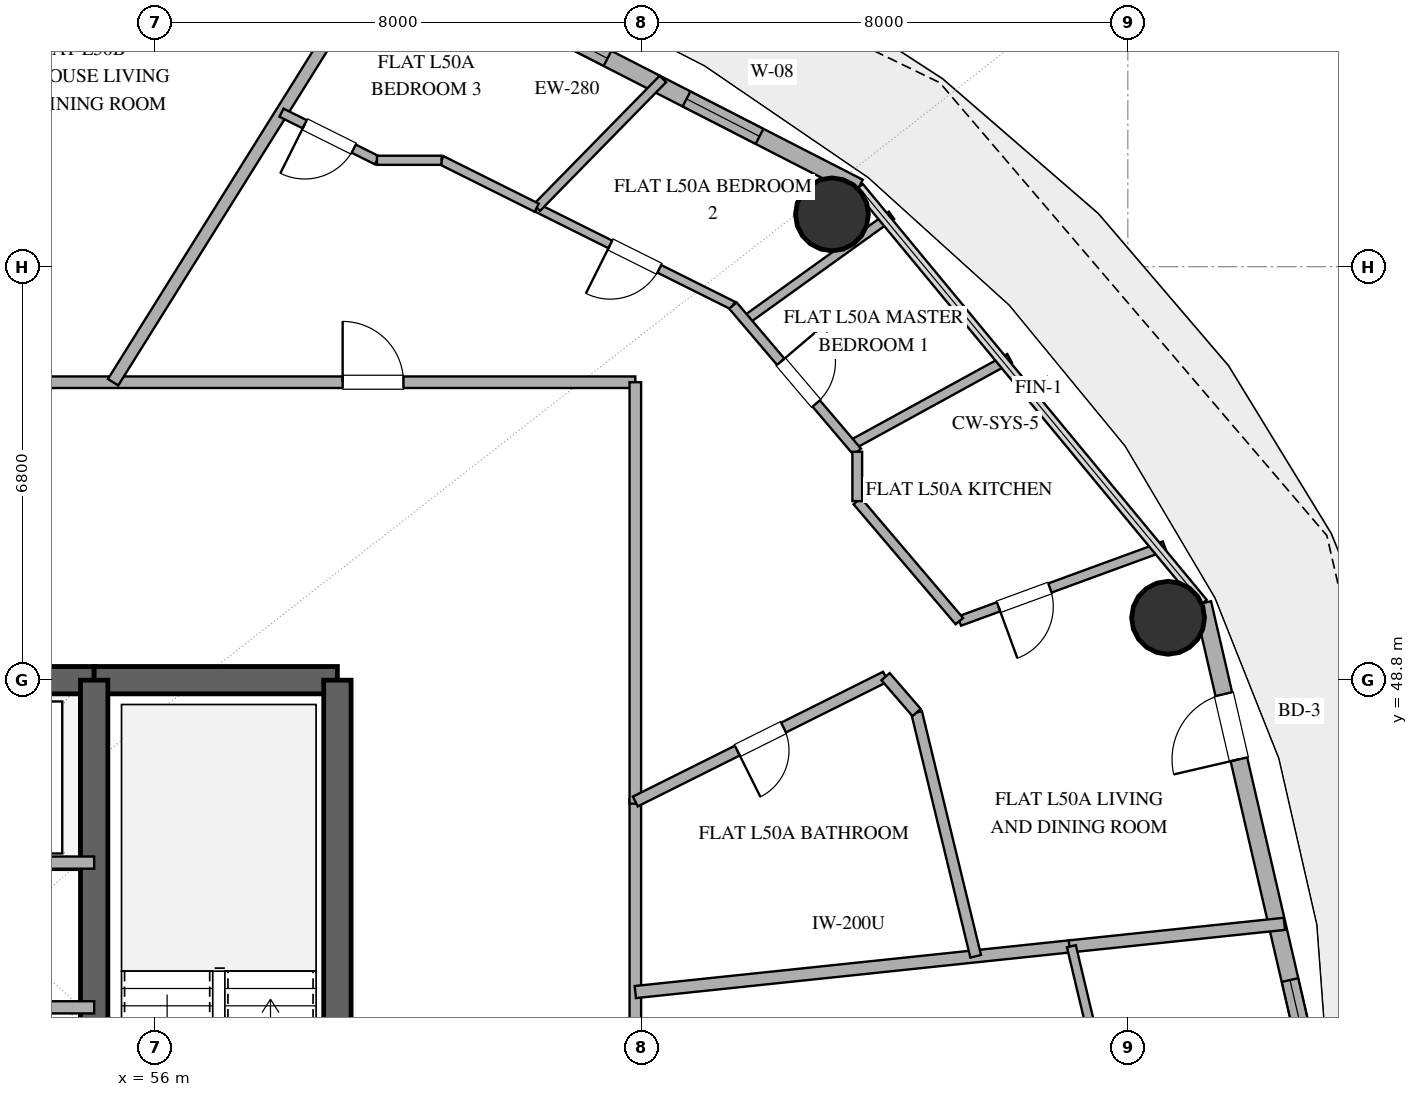
"""IFC4 building model, lengths in metres.
Left out: names, types, materials, properties, quantities, classifications, styles, units other than length and angle.
Written with IfcOpenShell. Run it as: python <this file> out.ifc"""

import sys

from ifc_helpers import new_model, si_unit, direction, frame, frame_2d, origin, origin_2d, place, context, subcontext, project, spatial, rectangle, hollow_circle, extrude, element, fill, save


model = new_model("IFC4")
c1 = context("Model", 3, precision=1e-05, world=origin(), true_north=direction((0.0, 1.0)))
c2 = subcontext(c1, "Body", "Model", "MODEL_VIEW")
j1 = project(units=[si_unit("LENGTHUNIT", "METRE"), si_unit("PLANEANGLEUNIT", "RADIAN")], contexts=[c1])
p1 = place(None, origin())
s1 = spatial("IfcSite", under=j1, at=p1, CompositionType="ELEMENT")
p2 = place(p1, origin())
s2 = spatial("IfcBuilding", under=s1, at=p2, CompositionType="ELEMENT")
p3 = place(p2, frame((0.0, 0.0, 197.4)))
s3 = spatial("IfcBuildingStorey", under=s2, at=p3, CompositionType="ELEMENT", Elevation=197.4)
p4 = place(p3, frame((41.0, 48.8, 0.0), z_axis=(0.0, 0.0, 1.0), x_axis=(1.0, 0.0, 0.0)))
e1 = element("IfcWall", 1, at=p4, inside=s3, PredefinedType="SHEAR", context=c2, shape_type="SweptSolid", body=[
    extrude(rectangle(XDim=14.0, YDim=0.45, at=frame_2d((7.0, 0.0))), origin(), (0.0, 0.0, 1.0), 3.25),
])
p5 = place(p4, frame((6.1, 0.0, 0.0)))
e2 = element("IfcOpeningElement", 2, at=p5, cuts=e1, PredefinedType="OPENING", context=c2, shape_type="SweptSolid", body=[
    extrude(rectangle(XDim=1.8, YDim=2.25, at=frame_2d((0.9, 1.125))), frame((0.0, 0.235, 0.0), z_axis=(0.0, -1.0, 0.0), x_axis=(1.0, 0.0, 0.0)), (0.0, 0.0, 1.0), 0.47),
])
p6 = place(p3, frame((55.0, 48.8, 0.0), z_axis=(0.0, 0.0, 1.0), x_axis=(1.0, 0.0, 0.0)))
e3 = element("IfcWall", 3, at=p6, inside=s3, PredefinedType="SHEAR", context=c2, shape_type="SweptSolid", body=[
    extrude(rectangle(XDim=4.0, YDim=0.45, at=frame_2d((2.0, 0.0))), origin(), (0.0, 0.0, 1.0), 3.25),
])
p7 = place(p3, frame((59.0, 35.2, 0.0), z_axis=(0.0, 0.0, 1.0), x_axis=(0.0, 1.0, 0.0)))
e4 = element("IfcWall", 4, at=p7, inside=s3, PredefinedType="SHEAR", context=c2, shape_type="SweptSolid", body=[
    extrude(rectangle(XDim=13.6, YDim=0.45, at=frame_2d((6.8, 0.0))), origin(), (0.0, 0.0, 1.0), 3.25),
])
p8 = place(p3, frame((55.0, 35.2, 0.0), z_axis=(0.0, 0.0, 1.0), x_axis=(0.0, 1.0, 0.0)))
e5 = element("IfcWall", 5, at=p8, inside=s3, PredefinedType="SHEAR", context=c2, shape_type="SweptSolid", body=[
    extrude(rectangle(XDim=13.6, YDim=0.45, at=frame_2d((6.8, 0.0))), origin(), (0.0, 0.0, 1.0), 3.25),
])
p9 = place(p8, frame((1.15, 0.0, 0.0)))
e6 = element("IfcOpeningElement", 6, at=p9, cuts=e5, PredefinedType="OPENING", context=c2, shape_type="SweptSolid", body=[
    extrude(rectangle(XDim=1.1, YDim=2.2, at=frame_2d((0.55, 1.1))), frame((0.0, 0.235, 0.0), z_axis=(0.0, -1.0, 0.0), x_axis=(1.0, 0.0, 0.0)), (0.0, 0.0, 1.0), 0.47),
])
for number, where, z_axis, x_axis in (
    (7, (72.662, 49.826, 0.0), (0.0, 0.0, 1.0), (1.0, 0.0, 0.0)),
    (8, (67.134, 56.46, 0.0), (0.0, 0.0, 1.0), (1.0, 0.0, 0.0)),
):
    element("IfcColumn", number, at=place(p3, frame(where, z_axis=z_axis, x_axis=x_axis)), inside=s3, PredefinedType="COLUMN", context=c2, shape_type="SweptSolid", body=[
        extrude(hollow_circle(Radius=0.6, WallThickness=0.032, at=origin_2d()), origin(), (0.0, 0.0, 1.0), 3.25),
    ])
p10 = place(p3, frame((75.099, 42.0, 0.0), z_axis=(0.0, 0.0, 1.0), x_axis=(-0.225473184558, 0.974249374157, 0.0)))
e9 = element("IfcWall", 9, at=p10, inside=s3, PredefinedType="SOLIDWALL", context=c2, shape_type="SweptSolid", body=[
    extrude(rectangle(XDim=8.28, YDim=0.28, at=frame_2d((4.14, 0.0))), origin(), (0.0, 0.0, 1.0), 3.25),
])
p11 = place(p10, frame((5.644, 0.0, 0.0)))
e10 = element("IfcOpeningElement", 10, at=p11, cuts=e9, PredefinedType="OPENING", context=c2, shape_type="SweptSolid", body=[
    extrude(rectangle(XDim=1.1, YDim=2.25, at=frame_2d((0.55, 1.125))), frame((0.0, 0.15, 0.0), z_axis=(0.0, -1.0, 0.0), x_axis=(1.0, 0.0, 0.0)), (0.0, 0.0, 1.0), 0.3),
])
p12 = place(p10, frame((0.918, 0.0, 0.85)))
e11 = element("IfcOpeningElement", 11, at=p12, cuts=e9, PredefinedType="OPENING", context=c2, shape_type="SweptSolid", body=[
    extrude(rectangle(XDim=1.0, YDim=1.8, at=frame_2d((0.5, 0.9))), frame((0.0, 0.15, 0.0), z_axis=(0.0, -1.0, 0.0), x_axis=(1.0, 0.0, 0.0)), (0.0, 0.0, 1.0), 0.3),
])
p13 = place(p3, frame((67.576, 56.906, 0.0), z_axis=(0.0, 0.0, 1.0), x_axis=(-0.889872523182, 0.456209263919, 0.0)))
e12 = element("IfcWall", 12, at=p13, inside=s3, PredefinedType="SOLIDWALL", context=c2, shape_type="SweptSolid", body=[
    extrude(rectangle(XDim=10.016, YDim=0.28, at=frame_2d((5.008, 0.0))), origin(), (0.0, 0.0, 1.0), 3.25),
])
p14 = place(p13, frame((1.835, 0.0, 0.85)))
e13 = element("IfcOpeningElement", 13, at=p14, cuts=e12, PredefinedType="OPENING", context=c2, shape_type="SweptSolid", body=[
    extrude(rectangle(XDim=1.35, YDim=1.8, at=frame_2d((0.675, 0.9))), frame((0.0, 0.15, 0.0), z_axis=(0.0, -1.0, 0.0), x_axis=(1.0, 0.0, 0.0)), (0.0, 0.0, 1.0), 0.3),
])
p15 = place(p13, frame((4.645, 0.0, 0.85)))
e14 = element("IfcOpeningElement", 14, at=p15, cuts=e12, PredefinedType="OPENING", context=c2, shape_type="SweptSolid", body=[
    extrude(rectangle(XDim=1.2, YDim=1.8, at=frame_2d((0.6, 0.9))), frame((0.0, 0.15, 0.0), z_axis=(0.0, -1.0, 0.0), x_axis=(1.0, 0.0, 0.0)), (0.0, 0.0, 1.0), 0.3),
])
p16 = place(p13, frame((6.559, 0.0, 0.85)))
e15 = element("IfcOpeningElement", 15, at=p16, cuts=e12, PredefinedType="OPENING", context=c2, shape_type="SweptSolid", body=[
    extrude(rectangle(XDim=1.2, YDim=1.8, at=frame_2d((0.6, 0.9))), frame((0.0, 0.15, 0.0), z_axis=(0.0, -1.0, 0.0), x_axis=(1.0, 0.0, 0.0)), (0.0, 0.0, 1.0), 0.3),
])
for number, where, z_axis, x_axis in (
    (16, (52.05, 43.42, 0.0), (0.0, 0.0, 1.0), (1.0, 0.0, 0.0)),
    (17, (52.05, 45.8, 0.0), (0.0, 0.0, 1.0), (1.0, 0.0, 0.0)),
):
    element("IfcWall", number, at=place(p3, frame(where, z_axis=z_axis, x_axis=x_axis)), inside=s3, PredefinedType="SOLIDWALL", context=c2, shape_type="SweptSolid", body=[
        extrude(rectangle(XDim=2.95, YDim=0.2, at=frame_2d((1.475, 0.0))), origin(), (0.0, 0.0, 1.0), 2.61),
    ])
p17 = place(p3, frame((44.784, 53.7, 0.0), z_axis=(0.0, 0.0, 1.0), x_axis=(1.0, 0.0, 0.0)))
e18 = element("IfcWall", 18, at=p17, inside=s3, PredefinedType="PARTITIONING", context=c2, shape_type="SweptSolid", body=[
    extrude(rectangle(XDim=19.116, YDim=0.19, at=frame_2d((9.558, 0.0))), origin(), (0.0, 0.0, 1.0), 2.61),
])
p18 = place(p17, frame((14.302, 0.0, 0.0)))
e19 = element("IfcOpeningElement", 19, at=p18, cuts=e18, PredefinedType="OPENING", context=c2, shape_type="SweptSolid", body=[
    extrude(rectangle(XDim=1.0, YDim=2.2, at=frame_2d((0.5, 1.1))), frame((0.0, 0.105, 0.0), z_axis=(0.0, -1.0, 0.0), x_axis=(1.0, 0.0, 0.0)), (0.0, 0.0, 1.0), 0.21),
])
p19 = place(p17, frame((6.783, 0.0, 0.0)))
e20 = element("IfcOpeningElement", 20, at=p19, cuts=e18, PredefinedType="OPENING", context=c2, shape_type="SweptSolid", body=[
    extrude(rectangle(XDim=1.0, YDim=2.2, at=frame_2d((0.5, 1.1))), frame((0.0, 0.105, 0.0), z_axis=(0.0, -1.0, 0.0), x_axis=(1.0, 0.0, 0.0)), (0.0, 0.0, 1.0), 0.21),
])
p20 = place(p3, frame((63.9, 46.841, 0.0), z_axis=(0.0, 0.0, 1.0), x_axis=(0.0, -1.0, 0.0)))
e21 = element("IfcWall", 21, at=p20, inside=s3, PredefinedType="PARTITIONING", context=c2, shape_type="SweptSolid", body=[
    extrude(rectangle(XDim=12.632, YDim=0.19, at=frame_2d((6.316, 0.0))), origin(), (0.0, 0.0, 1.0), 2.61),
])
p21 = place(p3, frame((63.9, 53.7, 0.0), z_axis=(0.0, 0.0, 1.0), x_axis=(0.0, -1.0, 0.0)))
e22 = element("IfcWall", 22, at=p21, inside=s3, PredefinedType="PARTITIONING", context=c2, shape_type="SweptSolid", body=[
    extrude(rectangle(XDim=6.931, YDim=0.19, at=frame_2d((3.465, 0.0))), origin(), (0.0, 0.0, 1.0), 2.61),
])
p22 = place(p3, frame((63.9, 43.671, 0.0), z_axis=(0.0, 0.0, 1.0), x_axis=(0.994523063153, 0.104517351942, 0.0)))
e23 = element("IfcWall", 23, at=p22, inside=s3, PredefinedType="PARTITIONING", context=c2, shape_type="SweptSolid", body=[
    extrude(rectangle(XDim=7.211, YDim=0.2, at=frame_2d((3.605, 0.0))), origin(), (0.0, 0.0, 1.0), 2.61),
])
p23 = place(p3, frame((55.311, 53.7, 0.0), z_axis=(0.0, 0.0, 1.0), x_axis=(0.529914717401, 0.848050937315, 0.0)))
e24 = element("IfcWall", 24, at=p23, inside=s3, PredefinedType="PARTITIONING", context=c2, shape_type="SweptSolid", body=[
    extrude(rectangle(XDim=8.599, YDim=0.2, at=frame_2d((4.299, 0.0))), origin(), (0.0, 0.0, 1.0), 2.61),
])
p24 = place(p3, frame((68.016, 48.858, 0.0), z_axis=(0.0, 0.0, 1.0), x_axis=(-0.894872643331, -0.446321579377, 0.0)))
e25 = element("IfcWall", 25, at=p24, inside=s3, PredefinedType="PLUMBINGWALL", context=c2, shape_type="SweptSolid", body=[
    extrude(rectangle(XDim=4.599, YDim=0.18, at=frame_2d((2.3, 0.0))), origin(), (0.0, 0.0, 1.0), 2.61),
])
p25 = place(p24, frame((1.875, 0.0, 0.0)))
e26 = element("IfcOpeningElement", 26, at=p25, cuts=e25, PredefinedType="OPENING", context=c2, shape_type="SweptSolid", body=[
    extrude(rectangle(XDim=0.85, YDim=2.1, at=frame_2d((0.425, 1.05))), frame((0.0, 0.1, 0.0), z_axis=(0.0, -1.0, 0.0), x_axis=(1.0, 0.0, 0.0)), (0.0, 0.0, 1.0), 0.2),
])
p26 = place(p3, frame((69.498, 44.26, 0.0), z_axis=(0.0, 0.0, 1.0), x_axis=(-0.235510241151, 0.97187186723, 0.0)))
e27 = element("IfcWall", 27, at=p26, inside=s3, PredefinedType="PLUMBINGWALL", context=c2, shape_type="SweptSolid", body=[
    extrude(rectangle(XDim=4.125, YDim=0.18, at=frame_2d((2.062, 0.0))), origin(), (0.0, 0.0, 1.0), 2.61),
])
p27 = place(p3, frame((65.505, 54.961, 0.0), z_axis=(0.0, 0.0, 1.0), x_axis=(-0.894941244144, 0.4461840086, 0.0)))
e28 = element("IfcWall", 28, at=p27, inside=s3, PredefinedType="PARTITIONING", context=c2, shape_type="SweptSolid", body=[
    extrude(rectangle(XDim=3.605, YDim=0.14, at=frame_2d((1.803, 0.0))), origin(), (0.0, 0.0, 1.0), 2.61),
])
p28 = place(p27, frame((1.353, 0.0, 0.0)))
e29 = element("IfcOpeningElement", 29, at=p28, cuts=e28, PredefinedType="OPENING", context=c2, shape_type="SweptSolid", body=[
    extrude(rectangle(XDim=0.9, YDim=2.1, at=frame_2d((0.45, 1.05))), frame((0.0, 0.08, 0.0), z_axis=(0.0, -1.0, 0.0), x_axis=(1.0, 0.0, 0.0)), (0.0, 0.0, 1.0), 0.16),
])
p29 = place(p3, frame((72.603, 51.006, 0.0), z_axis=(0.0, 0.0, 1.0), x_axis=(-0.939057046145, -0.343761347572, 0.0)))
e30 = element("IfcWall", 30, at=p29, inside=s3, PredefinedType="PLUMBINGWALL", context=c2, shape_type="SweptSolid", body=[
    extrude(rectangle(XDim=3.592, YDim=0.16, at=frame_2d((1.796, 0.0))), origin(), (0.0, 0.0, 1.0), 2.61),
])
p30 = place(p29, frame((2.006, 0.0, 0.0)))
e31 = element("IfcOpeningElement", 31, at=p30, cuts=e30, PredefinedType="OPENING", context=c2, shape_type="SweptSolid", body=[
    extrude(rectangle(XDim=0.9, YDim=2.1, at=frame_2d((0.45, 1.05))), frame((0.0, 0.09, 0.0), z_axis=(0.0, -1.0, 0.0), x_axis=(1.0, 0.0, 0.0)), (0.0, 0.0, 1.0), 0.18),
])
p31 = place(p3, frame((74.575, 44.793, 0.0), z_axis=(0.0, 0.0, 1.0), x_axis=(-0.994516359121, -0.104581123727, 0.0)))
e32 = element("IfcWall", 32, at=p31, inside=s3, PredefinedType="PARTITIONING", context=c2, shape_type="SweptSolid", body=[
    extrude(rectangle(XDim=3.555, YDim=0.2, at=frame_2d((1.778, 0.0))), origin(), (0.0, 0.0, 1.0), 2.61),
])
p32 = place(p3, frame((67.455, 52.668, 0.0), z_axis=(0.0, 0.0, 1.0), x_axis=(0.876839283097, 0.480783601653, 0.0)))
e33 = element("IfcWall", 33, at=p32, inside=s3, PredefinedType="PLUMBINGWALL", context=c2, shape_type="SweptSolid", body=[
    extrude(rectangle(XDim=2.965, YDim=0.16, at=frame_2d((1.482, 0.0))), origin(), (0.0, 0.0, 1.0), 2.61),
])
p33 = place(p3, frame((64.353, 58.687, 0.0), z_axis=(0.0, 0.0, 1.0), x_axis=(-0.699905055024, -0.714235895172, 0.0)))
e34 = element("IfcWall", 34, at=p33, inside=s3, PredefinedType="PARTITIONING", context=c2, shape_type="SweptSolid", body=[
    extrude(rectangle(XDim=2.964, YDim=0.15, at=frame_2d((1.482, 0.0))), origin(), (0.0, 0.0, 1.0), 2.61),
])
p34 = place(p3, frame((68.113, 56.444, 0.0), z_axis=(0.0, 0.0, 1.0), x_axis=(-0.812258557349, -0.583297553581, 0.0)))
e35 = element("IfcWall", 35, at=p34, inside=s3, PredefinedType="PARTITIONING", context=c2, shape_type="SweptSolid", body=[
    extrude(rectangle(XDim=2.958, YDim=0.15, at=frame_2d((1.479, 0.0))), origin(), (0.0, 0.0, 1.0), 2.61),
])
p35 = place(p3, frame((65.505, 54.961, 0.0), z_axis=(0.0, 0.0, 1.0), x_axis=(0.647888606369, -0.761735094201, 0.0)))
e36 = element("IfcWall", 36, at=p35, inside=s3, PredefinedType="PLUMBINGWALL", context=c2, shape_type="SweptSolid", body=[
    extrude(rectangle(XDim=3.157, YDim=0.16, at=frame_2d((1.578, 0.0))), origin(), (0.0, 0.0, 1.0), 2.61),
])
p36 = place(p35, frame((1.215, 0.0, 0.0)))
e37 = element("IfcOpeningElement", 37, at=p36, cuts=e36, PredefinedType="OPENING", context=c2, shape_type="SweptSolid", body=[
    extrude(rectangle(XDim=0.9, YDim=2.1, at=frame_2d((0.45, 1.05))), frame((0.0, 0.09, 0.0), z_axis=(0.0, -1.0, 0.0), x_axis=(1.0, 0.0, 0.0)), (0.0, 0.0, 1.0), 0.18),
])
p37 = place(p3, frame((69.229, 49.771, 0.0), z_axis=(0.0, 0.0, 1.0), x_axis=(-0.648055845939, 0.761592818076, 0.0)))
e38 = element("IfcWall", 38, at=p37, inside=s3, PredefinedType="PLUMBINGWALL", context=c2, shape_type="SweptSolid", body=[
    extrude(rectangle(XDim=2.591, YDim=0.16, at=frame_2d((1.295, 0.0))), origin(), (0.0, 0.0, 1.0), 2.61),
])
p38 = place(p3, frame((71.649, 42.0, 0.0), z_axis=(0.0, 0.0, 1.0), x_axis=(-0.231642596653, 0.972800959814, 0.0)))
e39 = element("IfcWall", 39, at=p38, inside=s3, PredefinedType="PARTITIONING", context=c2, shape_type="SweptSolid", body=[
    extrude(rectangle(XDim=2.493, YDim=0.15, at=frame_2d((1.246, 0.0))), origin(), (0.0, 0.0, 1.0), 2.61),
])
p39 = place(p3, frame((59.651, 57.35, 0.0), z_axis=(0.0, 0.0, 1.0), x_axis=(-0.895038630404, 0.445988621027, 0.0)))
e40 = element("IfcWall", 40, at=p39, inside=s3, PredefinedType="PARTITIONING", context=c2, shape_type="SweptSolid", body=[
    extrude(rectangle(XDim=1.754, YDim=0.15, at=frame_2d((0.877, 0.0))), origin(), (0.0, 0.0, 1.0), 2.61),
])
p40 = place(p39, frame((0.427, 0.0, 0.0)))
e41 = element("IfcOpeningElement", 41, at=p40, cuts=e40, PredefinedType="OPENING", context=c2, shape_type="SweptSolid", body=[
    extrude(rectangle(XDim=0.9, YDim=2.1, at=frame_2d((0.45, 1.05))), frame((0.0, 0.085, 0.0), z_axis=(0.0, -1.0, 0.0), x_axis=(1.0, 0.0, 0.0)), (0.0, 0.0, 1.0), 0.17),
])
p41 = place(p3, frame((62.278, 56.57, 0.0), z_axis=(0.0, 0.0, 1.0), x_axis=(-0.894929238491, 0.446208088333, 0.0)))
e42 = element("IfcWall", 42, at=p41, inside=s3, PredefinedType="PARTITIONING", context=c2, shape_type="SweptSolid", body=[
    extrude(rectangle(XDim=1.749, YDim=0.15, at=frame_2d((0.875, 0.0))), origin(), (0.0, 0.0, 1.0), 2.61),
])
p42 = place(p3, frame((60.713, 57.35, 0.0), z_axis=(0.0, 0.0, 1.0), x_axis=(-1.0, 0.0, 0.0)))
e43 = element("IfcWall", 43, at=p42, inside=s3, PredefinedType="PARTITIONING", context=c2, shape_type="SweptSolid", body=[
    extrude(rectangle(XDim=1.062, YDim=0.15, at=frame_2d((0.531, 0.0))), origin(), (0.0, 0.0, 1.0), 2.61),
])
p43 = place(p3, frame((67.55, 51.744, 0.0), z_axis=(0.0, 0.0, 1.0), x_axis=(0.0, 1.0, 0.0)))
e44 = element("IfcWall", 44, at=p43, inside=s3, PredefinedType="PLUMBINGWALL", context=c2, shape_type="SweptSolid", body=[
    extrude(rectangle(XDim=0.812, YDim=0.16, at=frame_2d((0.406, 0.0))), origin(), (0.0, 0.0, 1.0), 2.61),
])
p44 = place(p3, frame((68.526, 48.268, 0.0), z_axis=(0.0, 0.0, 1.0), x_axis=(-0.654572928685, 0.755998863116, 0.0)))
e45 = element("IfcWall", 45, at=p44, inside=s3, PredefinedType="PLUMBINGWALL", context=c2, shape_type="SweptSolid", body=[
    extrude(rectangle(XDim=0.78, YDim=0.18, at=frame_2d((0.39, 0.0))), origin(), (0.0, 0.0, 1.0), 2.61),
])
p45 = place(p11, origin())
e46 = element("IfcDoor", 46, at=p45, inside=s3, OperationType="SINGLE_SWING_LEFT", PredefinedType="DOOR", context=c2, shape_type="SweptSolid", body=[
    extrude(rectangle(XDim=1.1, YDim=2.25, at=frame_2d((0.55, 1.125))), frame((0.0, 0.025, 0.0), z_axis=(0.0, -1.0, 0.0), x_axis=(1.0, 0.0, 0.0)), (0.0, 0.0, 1.0), 0.05),
])
fill(e10, e46)
p46 = place(p14, origin())
e47 = element("IfcWindow", 47, at=p46, inside=s3, PartitioningType="SINGLE_PANEL", PredefinedType="WINDOW", context=c2, shape_type="SweptSolid", body=[
    extrude(rectangle(XDim=1.35, YDim=1.8, at=frame_2d((0.675, 0.9))), frame((0.0, 0.03, 0.0), z_axis=(0.0, -1.0, 0.0), x_axis=(1.0, 0.0, 0.0)), (0.0, 0.0, 1.0), 0.06),
])
fill(e13, e47)
p47 = place(p15, origin())
e48 = element("IfcWindow", 48, at=p47, inside=s3, PartitioningType="SINGLE_PANEL", PredefinedType="WINDOW", context=c2, shape_type="SweptSolid", body=[
    extrude(rectangle(XDim=1.2, YDim=1.8, at=frame_2d((0.6, 0.9))), frame((0.0, 0.03, 0.0), z_axis=(0.0, -1.0, 0.0), x_axis=(1.0, 0.0, 0.0)), (0.0, 0.0, 1.0), 0.06),
])
fill(e14, e48)
p48 = place(p12, origin())
e49 = element("IfcWindow", 49, at=p48, inside=s3, PartitioningType="SINGLE_PANEL", PredefinedType="WINDOW", context=c2, shape_type="SweptSolid", body=[
    extrude(rectangle(XDim=1.0, YDim=1.8, at=frame_2d((0.5, 0.9))), frame((0.0, 0.03, 0.0), z_axis=(0.0, -1.0, 0.0), x_axis=(1.0, 0.0, 0.0)), (0.0, 0.0, 1.0), 0.06),
])
fill(e11, e49)
p49 = place(p18, origin())
e50 = element("IfcDoor", 50, at=p49, inside=s3, OperationType="SINGLE_SWING_LEFT", PredefinedType="DOOR", context=c2, shape_type="SweptSolid", body=[
    extrude(rectangle(XDim=1.0, YDim=2.2, at=frame_2d((0.5, 1.1))), frame((0.0, 0.025, 0.0), z_axis=(0.0, -1.0, 0.0), x_axis=(1.0, 0.0, 0.0)), (0.0, 0.0, 1.0), 0.05),
])
fill(e19, e50)
p50 = place(p25, origin())
e51 = element("IfcDoor", 51, at=p50, inside=s3, OperationType="SINGLE_SWING_RIGHT", PredefinedType="DOOR", context=c2, shape_type="SweptSolid", body=[
    extrude(rectangle(XDim=0.85, YDim=2.1, at=frame_2d((0.425, 1.05))), frame((0.0, 0.025, 0.0), z_axis=(0.0, -1.0, 0.0), x_axis=(1.0, 0.0, 0.0)), (0.0, 0.0, 1.0), 0.05),
])
fill(e26, e51)
p51 = place(p28, origin())
e52 = element("IfcDoor", 52, at=p51, inside=s3, OperationType="SINGLE_SWING_RIGHT", PredefinedType="DOOR", context=c2, shape_type="SweptSolid", body=[
    extrude(rectangle(XDim=0.9, YDim=2.1, at=frame_2d((0.45, 1.05))), frame((0.0, 0.025, 0.0), z_axis=(0.0, -1.0, 0.0), x_axis=(1.0, 0.0, 0.0)), (0.0, 0.0, 1.0), 0.05),
])
fill(e29, e52)
p52 = place(p30, origin())
e53 = element("IfcDoor", 53, at=p52, inside=s3, OperationType="SINGLE_SWING_RIGHT", PredefinedType="DOOR", context=c2, shape_type="SweptSolid", body=[
    extrude(rectangle(XDim=0.9, YDim=2.1, at=frame_2d((0.45, 1.05))), frame((0.0, 0.025, 0.0), z_axis=(0.0, -1.0, 0.0), x_axis=(1.0, 0.0, 0.0)), (0.0, 0.0, 1.0), 0.05),
])
fill(e31, e53)
p53 = place(p36, origin())
e54 = element("IfcDoor", 54, at=p53, inside=s3, OperationType="SINGLE_SWING_LEFT", PredefinedType="DOOR", context=c2, shape_type="SweptSolid", body=[
    extrude(rectangle(XDim=0.9, YDim=2.1, at=frame_2d((0.45, 1.05))), frame((0.0, 0.025, 0.0), z_axis=(0.0, -1.0, 0.0), x_axis=(1.0, 0.0, 0.0)), (0.0, 0.0, 1.0), 0.05),
])
fill(e37, e54)
p54 = place(p40, origin())
e55 = element("IfcDoor", 55, at=p54, inside=s3, OperationType="SINGLE_SWING_RIGHT", PredefinedType="DOOR", context=c2, shape_type="SweptSolid", body=[
    extrude(rectangle(XDim=0.9, YDim=2.1, at=frame_2d((0.45, 1.05))), frame((0.0, 0.025, 0.0), z_axis=(0.0, -1.0, 0.0), x_axis=(1.0, 0.0, 0.0)), (0.0, 0.0, 1.0), 0.05),
])
fill(e41, e55)
save(model, sys.argv[1])
